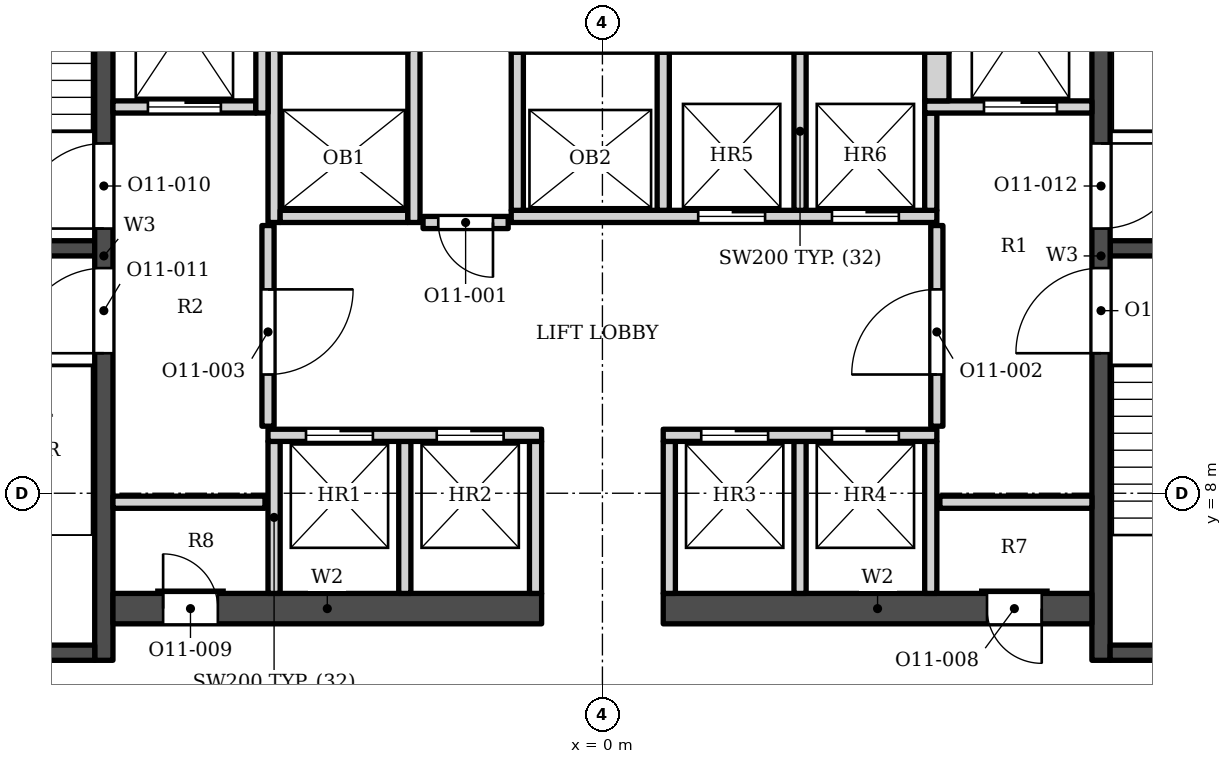
"""IFC4 building model, lengths in metres.
Left out: names, types, materials, properties, quantities, classifications, styles, units other than length and angle.
Written with IfcOpenShell. Run it as: python <this file> out.ifc"""

import sys

from ifc_helpers import new_model, si_unit, direction, frame, frame_2d, origin, place, context, subcontext, project, spatial, rectangle, extrude, element, fill, save


model = new_model("IFC4")
c1 = context("Model", 3, precision=1e-05, world=origin(), true_north=direction((0.0, 1.0)))
c2 = subcontext(c1, "Body", "Model", "MODEL_VIEW")
j1 = project(units=[si_unit("LENGTHUNIT", "METRE"), si_unit("PLANEANGLEUNIT", "RADIAN")], contexts=[c1])
p1 = place(None, origin())
s1 = spatial("IfcSite", under=j1, at=p1, CompositionType="ELEMENT")
p2 = place(p1, origin())
s2 = spatial("IfcBuilding", under=s1, at=p2, CompositionType="ELEMENT")
p3 = place(p2, frame((0.0, 0.0, 271.6)))
s3 = spatial("IfcBuildingStorey", under=s2, at=p3, CompositionType="ELEMENT", Elevation=271.6)
p4 = place(p3, frame((-8.2, 5.253, 0.0), z_axis=(0.0, 0.0, 1.0), x_axis=(0.0, 1.0, 0.0)))
e1 = element("IfcWall", 1, at=p4, inside=s3, PredefinedType="SHEAR", context=c2, shape_type="SweptSolid", body=[
    extrude(rectangle(XDim=13.3, YDim=0.3, at=frame_2d((6.65, 0.0))), origin(), (0.0, 0.0, 1.0), 3.9),
])
p5 = place(p4, frame((7.1, 0.0, 0.0)))
e2 = element("IfcOpeningElement", 2, at=p5, cuts=e1, PredefinedType="OPENING", context=c2, shape_type="SweptSolid", body=[
    extrude(rectangle(XDim=1.4, YDim=2.1, at=frame_2d((0.7, 1.05))), frame((0.0, 0.16, 0.0), z_axis=(0.0, -1.0, 0.0), x_axis=(1.0, 0.0, 0.0)), (0.0, 0.0, 1.0), 0.32),
])
p6 = place(p4, frame((5.05, 0.0, 0.0)))
e3 = element("IfcOpeningElement", 3, at=p6, cuts=e1, PredefinedType="OPENING", context=c2, shape_type="SweptSolid", body=[
    extrude(rectangle(XDim=1.4, YDim=2.1, at=frame_2d((0.7, 1.05))), frame((0.0, 0.16, 0.0), z_axis=(0.0, -1.0, 0.0), x_axis=(1.0, 0.0, 0.0)), (0.0, 0.0, 1.0), 0.32),
])
for number, where, z_axis, x_axis in (
    (4, (-12.1, 12.028, 0.0), (0.0, 0.0, 1.0), (1.0, 0.0, 0.0)),
    (5, (-12.1, 5.378, 0.0), (0.0, 0.0, 1.0), (1.0, 0.0, 0.0)),
):
    element("IfcWall", number, at=place(p3, frame(where, z_axis=z_axis, x_axis=x_axis)), inside=s3, PredefinedType="SHEAR", context=c2, shape_type="SweptSolid", body=[
        extrude(rectangle(XDim=3.75, YDim=0.25, at=frame_2d((1.875, 0.0))), origin(), (0.0, 0.0, 1.0), 3.9),
    ])
p7 = place(p3, frame((8.2, 5.253, 0.0), z_axis=(0.0, 0.0, 1.0), x_axis=(0.0, 1.0, 0.0)))
e6 = element("IfcWall", 6, at=p7, inside=s3, PredefinedType="SHEAR", context=c2, shape_type="SweptSolid", body=[
    extrude(rectangle(XDim=13.3, YDim=0.3, at=frame_2d((6.65, 0.0))), origin(), (0.0, 0.0, 1.0), 3.9),
])
p8 = place(p7, frame((7.1, 0.0, 0.0)))
e7 = element("IfcOpeningElement", 7, at=p8, cuts=e6, PredefinedType="OPENING", context=c2, shape_type="SweptSolid", body=[
    extrude(rectangle(XDim=1.4, YDim=2.1, at=frame_2d((0.7, 1.05))), frame((0.0, 0.16, 0.0), z_axis=(0.0, -1.0, 0.0), x_axis=(1.0, 0.0, 0.0)), (0.0, 0.0, 1.0), 0.32),
])
p9 = place(p7, frame((5.05, 0.0, 0.0)))
e8 = element("IfcOpeningElement", 8, at=p9, cuts=e6, PredefinedType="OPENING", context=c2, shape_type="SweptSolid", body=[
    extrude(rectangle(XDim=1.4, YDim=2.1, at=frame_2d((0.7, 1.05))), frame((0.0, 0.16, 0.0), z_axis=(0.0, -1.0, 0.0), x_axis=(1.0, 0.0, 0.0)), (0.0, 0.0, 1.0), 0.32),
])
for number, where, z_axis, x_axis in (
    (9, (8.35, 12.028, 0.0), (0.0, 0.0, 1.0), (1.0, 0.0, 0.0)),
    (10, (8.35, 5.378, 0.0), (0.0, 0.0, 1.0), (1.0, 0.0, 0.0)),
):
    element("IfcWall", number, at=place(p3, frame(where, z_axis=z_axis, x_axis=x_axis)), inside=s3, PredefinedType="SHEAR", context=c2, shape_type="SweptSolid", body=[
        extrude(rectangle(XDim=3.75, YDim=0.25, at=frame_2d((1.875, 0.0))), origin(), (0.0, 0.0, 1.0), 3.9),
    ])
p10 = place(p3, frame((-8.05, 6.103, 0.0), z_axis=(0.0, 0.0, 1.0), x_axis=(1.0, 0.0, 0.0)))
e11 = element("IfcWall", 11, at=p10, inside=s3, PredefinedType="SHEAR", context=c2, shape_type="SweptSolid", body=[
    extrude(rectangle(XDim=7.05, YDim=0.5, at=frame_2d((3.525, 0.0))), origin(), (0.0, 0.0, 1.0), 3.9),
])
p11 = place(p10, frame((0.825, 0.0, 0.0)))
e12 = element("IfcOpeningElement", 12, at=p11, cuts=e11, PredefinedType="OPENING", context=c2, shape_type="SweptSolid", body=[
    extrude(rectangle(XDim=0.9, YDim=2.1, at=frame_2d((0.45, 1.05))), frame((0.0, 0.26, 0.0), z_axis=(0.0, -1.0, 0.0), x_axis=(1.0, 0.0, 0.0)), (0.0, 0.0, 1.0), 0.52),
])
p12 = place(p3, frame((1.0, 6.103, 0.0), z_axis=(0.0, 0.0, 1.0), x_axis=(1.0, 0.0, 0.0)))
e13 = element("IfcWall", 13, at=p12, inside=s3, PredefinedType="SHEAR", context=c2, shape_type="SweptSolid", body=[
    extrude(rectangle(XDim=7.05, YDim=0.5, at=frame_2d((3.525, 0.0))), origin(), (0.0, 0.0, 1.0), 3.9),
])
p13 = place(p12, frame((5.325, 0.0, 0.0)))
e14 = element("IfcOpeningElement", 14, at=p13, cuts=e13, PredefinedType="OPENING", context=c2, shape_type="SweptSolid", body=[
    extrude(rectangle(XDim=0.9, YDim=2.1, at=frame_2d((0.45, 1.05))), frame((0.0, 0.26, 0.0), z_axis=(0.0, -1.0, 0.0), x_axis=(1.0, 0.0, 0.0)), (0.0, 0.0, 1.0), 0.52),
])
for number, where, z_axis, x_axis in (
    (15, (-5.4, 6.353, 0.0), (0.0, 0.0, 1.0), (0.0, 1.0, 0.0)),
    (16, (-3.25, 6.353, 0.0), (0.0, 0.0, 1.0), (0.0, 1.0, 0.0)),
    (17, (-1.1, 6.353, 0.0), (0.0, 0.0, 1.0), (0.0, 1.0, 0.0)),
    (18, (1.1, 6.353, 0.0), (0.0, 0.0, 1.0), (0.0, 1.0, 0.0)),
    (19, (3.25, 6.353, 0.0), (0.0, 0.0, 1.0), (0.0, 1.0, 0.0)),
    (20, (5.4, 6.353, 0.0), (0.0, 0.0, 1.0), (0.0, 1.0, 0.0)),
    (21, (-8.05, 7.853, 0.0), (0.0, 0.0, 1.0), (1.0, 0.0, 0.0)),
    (22, (5.55, 7.853, 0.0), (0.0, 0.0, 1.0), (1.0, 0.0, 0.0)),
):
    element("IfcWall", number, at=place(p3, frame(where, z_axis=z_axis, x_axis=x_axis)), inside=s3, PredefinedType="SOLIDWALL", context=c2, shape_type="SweptSolid", body=[
        extrude(rectangle(XDim=2.5, YDim=0.2, at=frame_2d((1.25, 0.0))), origin(), (0.0, 0.0, 1.0), 3.73),
    ])
p14 = place(p3, frame((-5.5, 8.953, 0.0), z_axis=(0.0, 0.0, 1.0), x_axis=(1.0, 0.0, 0.0)))
e23 = element("IfcWall", 23, at=p14, inside=s3, PredefinedType="SOLIDWALL", context=c2, shape_type="SweptSolid", body=[
    extrude(rectangle(XDim=4.5, YDim=0.2, at=frame_2d((2.25, 0.0))), origin(), (0.0, 0.0, 1.0), 3.73),
])
p15 = place(p14, frame((0.625, 0.0, 0.0)))
e24 = element("IfcOpeningElement", 24, at=p15, cuts=e23, PredefinedType="OPENING", context=c2, shape_type="SweptSolid", body=[
    extrude(rectangle(XDim=1.1, YDim=2.1, at=frame_2d((0.55, 1.05))), frame((0.0, 0.11, 0.0), z_axis=(0.0, -1.0, 0.0), x_axis=(1.0, 0.0, 0.0)), (0.0, 0.0, 1.0), 0.22),
])
p16 = place(p14, frame((2.775, 0.0, 0.0)))
e25 = element("IfcOpeningElement", 25, at=p16, cuts=e23, PredefinedType="OPENING", context=c2, shape_type="SweptSolid", body=[
    extrude(rectangle(XDim=1.1, YDim=2.1, at=frame_2d((0.55, 1.05))), frame((0.0, 0.11, 0.0), z_axis=(0.0, -1.0, 0.0), x_axis=(1.0, 0.0, 0.0)), (0.0, 0.0, 1.0), 0.22),
])
p17 = place(p3, frame((1.0, 8.953, 0.0), z_axis=(0.0, 0.0, 1.0), x_axis=(1.0, 0.0, 0.0)))
e26 = element("IfcWall", 26, at=p17, inside=s3, PredefinedType="SOLIDWALL", context=c2, shape_type="SweptSolid", body=[
    extrude(rectangle(XDim=4.5, YDim=0.2, at=frame_2d((2.25, 0.0))), origin(), (0.0, 0.0, 1.0), 3.73),
])
p18 = place(p17, frame((0.625, 0.0, 0.0)))
e27 = element("IfcOpeningElement", 27, at=p18, cuts=e26, PredefinedType="OPENING", context=c2, shape_type="SweptSolid", body=[
    extrude(rectangle(XDim=1.1, YDim=2.1, at=frame_2d((0.55, 1.05))), frame((0.0, 0.11, 0.0), z_axis=(0.0, -1.0, 0.0), x_axis=(1.0, 0.0, 0.0)), (0.0, 0.0, 1.0), 0.22),
])
p19 = place(p17, frame((2.775, 0.0, 0.0)))
e28 = element("IfcOpeningElement", 28, at=p19, cuts=e26, PredefinedType="OPENING", context=c2, shape_type="SweptSolid", body=[
    extrude(rectangle(XDim=1.1, YDim=2.1, at=frame_2d((0.55, 1.05))), frame((0.0, 0.11, 0.0), z_axis=(0.0, -1.0, 0.0), x_axis=(1.0, 0.0, 0.0)), (0.0, 0.0, 1.0), 0.22),
])
p20 = place(p3, frame((-5.5, 9.103, 0.0), z_axis=(0.0, 0.0, 1.0), x_axis=(0.0, 1.0, 0.0)))
e29 = element("IfcWall", 29, at=p20, inside=s3, PredefinedType="SOLIDWALL", context=c2, shape_type="SweptSolid", body=[
    extrude(rectangle(XDim=3.3, YDim=0.2, at=frame_2d((1.65, 0.0))), origin(), (0.0, 0.0, 1.0), 3.73),
])
p21 = place(p20, frame((0.85, 0.0, 0.0)))
e30 = element("IfcOpeningElement", 30, at=p21, cuts=e29, PredefinedType="OPENING", context=c2, shape_type="SweptSolid", body=[
    extrude(rectangle(XDim=1.4, YDim=2.1, at=frame_2d((0.7, 1.05))), frame((0.0, 0.11, 0.0), z_axis=(0.0, -1.0, 0.0), x_axis=(1.0, 0.0, 0.0)), (0.0, 0.0, 1.0), 0.22),
])
p22 = place(p3, frame((5.5, 9.103, 0.0), z_axis=(0.0, 0.0, 1.0), x_axis=(0.0, 1.0, 0.0)))
e31 = element("IfcWall", 31, at=p22, inside=s3, PredefinedType="SOLIDWALL", context=c2, shape_type="SweptSolid", body=[
    extrude(rectangle(XDim=3.3, YDim=0.2, at=frame_2d((1.65, 0.0))), origin(), (0.0, 0.0, 1.0), 3.73),
])
p23 = place(p22, frame((0.85, 0.0, 0.0)))
e32 = element("IfcOpeningElement", 32, at=p23, cuts=e31, PredefinedType="OPENING", context=c2, shape_type="SweptSolid", body=[
    extrude(rectangle(XDim=1.4, YDim=2.1, at=frame_2d((0.7, 1.05))), frame((0.0, 0.11, 0.0), z_axis=(0.0, -1.0, 0.0), x_axis=(1.0, 0.0, 0.0)), (0.0, 0.0, 1.0), 0.22),
])
p24 = place(p3, frame((-2.95, 12.453, 0.0), z_axis=(0.0, 0.0, 1.0), x_axis=(1.0, 0.0, 0.0)))
e33 = element("IfcWall", 33, at=p24, inside=s3, PredefinedType="SOLIDWALL", context=c2, shape_type="SweptSolid", body=[
    extrude(rectangle(XDim=1.4, YDim=0.2, at=frame_2d((0.7, 0.0))), origin(), (0.0, 0.0, 1.0), 3.73),
])
p25 = place(p24, frame((0.25, 0.0, 0.0)))
e34 = element("IfcOpeningElement", 34, at=p25, cuts=e33, PredefinedType="OPENING", context=c2, shape_type="SweptSolid", body=[
    extrude(rectangle(XDim=0.9, YDim=2.1, at=frame_2d((0.45, 1.05))), frame((0.0, 0.11, 0.0), z_axis=(0.0, -1.0, 0.0), x_axis=(1.0, 0.0, 0.0)), (0.0, 0.0, 1.0), 0.22),
])
p26 = place(p3, frame((-5.4, 12.453, 0.0), z_axis=(0.0, 0.0, 1.0), x_axis=(0.0, 1.0, 0.0)))
e35 = element("IfcWall", 35, at=p26, inside=s3, PredefinedType="SOLIDWALL", context=c2, shape_type="SweptSolid", body=[
    extrude(rectangle(XDim=3.0, YDim=0.2, at=frame_2d((1.5, 0.0))), origin(), (0.0, 0.0, 1.0), 3.73),
])
p27 = place(p3, frame((-5.3, 12.552, 0.0), z_axis=(0.0, 0.0, 1.0), x_axis=(1.0, 0.0, 0.0)))
e36 = element("IfcWall", 36, at=p27, inside=s3, PredefinedType="SOLIDWALL", context=c2, shape_type="SweptSolid", body=[
    extrude(rectangle(XDim=2.1, YDim=0.2, at=frame_2d((1.05, 0.0))), origin(), (0.0, 0.0, 1.0), 3.73),
])
p28 = place(p3, frame((-3.1, 12.453, 0.0), z_axis=(0.0, 0.0, 1.0), x_axis=(0.0, 1.0, 0.0)))
e37 = element("IfcWall", 37, at=p28, inside=s3, PredefinedType="SOLIDWALL", context=c2, shape_type="SweptSolid", body=[
    extrude(rectangle(XDim=3.0, YDim=0.2, at=frame_2d((1.5, 0.0))), origin(), (0.0, 0.0, 1.0), 3.73),
])
p29 = place(p3, frame((-1.5, 12.552, 0.0), z_axis=(0.0, 0.0, 1.0), x_axis=(1.0, 0.0, 0.0)))
e38 = element("IfcWall", 38, at=p29, inside=s3, PredefinedType="SOLIDWALL", context=c2, shape_type="SweptSolid", body=[
    extrude(rectangle(XDim=7.0, YDim=0.2, at=frame_2d((3.5, 0.0))), origin(), (0.0, 0.0, 1.0), 3.73),
])
p30 = place(p29, frame((3.075, 0.0, 0.0)))
e39 = element("IfcOpeningElement", 39, at=p30, cuts=e38, PredefinedType="OPENING", context=c2, shape_type="SweptSolid", body=[
    extrude(rectangle(XDim=1.1, YDim=2.1, at=frame_2d((0.55, 1.05))), frame((0.0, 0.11, 0.0), z_axis=(0.0, -1.0, 0.0), x_axis=(1.0, 0.0, 0.0)), (0.0, 0.0, 1.0), 0.22),
])
p31 = place(p29, frame((5.275, 0.0, 0.0)))
e40 = element("IfcOpeningElement", 40, at=p31, cuts=e38, PredefinedType="OPENING", context=c2, shape_type="SweptSolid", body=[
    extrude(rectangle(XDim=1.1, YDim=2.1, at=frame_2d((0.55, 1.05))), frame((0.0, 0.11, 0.0), z_axis=(0.0, -1.0, 0.0), x_axis=(1.0, 0.0, 0.0)), (0.0, 0.0, 1.0), 0.22),
])
for number, where, z_axis, x_axis in (
    (41, (-1.4, 12.653, 0.0), (0.0, 0.0, 1.0), (0.0, 1.0, 0.0)),
    (42, (1.0, 12.653, 0.0), (0.0, 0.0, 1.0), (0.0, 1.0, 0.0)),
    (43, (3.25, 12.653, 0.0), (0.0, 0.0, 1.0), (0.0, 1.0, 0.0)),
):
    element("IfcWall", number, at=place(p3, frame(where, z_axis=z_axis, x_axis=x_axis)), inside=s3, PredefinedType="SOLIDWALL", context=c2, shape_type="SweptSolid", body=[
        extrude(rectangle(XDim=2.6, YDim=0.2, at=frame_2d((1.3, 0.0))), origin(), (0.0, 0.0, 1.0), 3.73),
    ])
p32 = place(p3, frame((5.4, 12.653, 0.0), z_axis=(0.0, 0.0, 1.0), x_axis=(0.0, 1.0, 0.0)))
e44 = element("IfcWall", 44, at=p32, inside=s3, PredefinedType="SOLIDWALL", context=c2, shape_type="SweptSolid", body=[
    extrude(rectangle(XDim=1.6, YDim=0.2, at=frame_2d((0.8, 0.0))), origin(), (0.0, 0.0, 1.0), 3.73),
])
p33 = place(p3, frame((-8.05, 14.353, 0.0), z_axis=(0.0, 0.0, 1.0), x_axis=(1.0, 0.0, 0.0)))
e45 = element("IfcWall", 45, at=p33, inside=s3, PredefinedType="SOLIDWALL", context=c2, shape_type="SweptSolid", body=[
    extrude(rectangle(XDim=2.35, YDim=0.2, at=frame_2d((1.175, 0.0))), origin(), (0.0, 0.0, 1.0), 3.73),
])
p34 = place(p33, frame((0.575, 0.0, 0.0)))
e46 = element("IfcOpeningElement", 46, at=p34, cuts=e45, PredefinedType="OPENING", context=c2, shape_type="SweptSolid", body=[
    extrude(rectangle(XDim=1.2, YDim=2.1, at=frame_2d((0.6, 1.05))), frame((0.0, 0.11, 0.0), z_axis=(0.0, -1.0, 0.0), x_axis=(1.0, 0.0, 0.0)), (0.0, 0.0, 1.0), 0.22),
])
p35 = place(p3, frame((-5.6, 14.253, 0.0), z_axis=(0.0, 0.0, 1.0), x_axis=(0.0, 1.0, 0.0)))
e47 = element("IfcWall", 47, at=p35, inside=s3, PredefinedType="SOLIDWALL", context=c2, shape_type="SweptSolid", body=[
    extrude(rectangle(XDim=4.3, YDim=0.2, at=frame_2d((2.15, 0.0))), origin(), (0.0, 0.0, 1.0), 3.73),
])
p36 = place(p3, frame((5.3, 14.353, 0.0), z_axis=(0.0, 0.0, 1.0), x_axis=(1.0, 0.0, 0.0)))
e48 = element("IfcWall", 48, at=p36, inside=s3, PredefinedType="SOLIDWALL", context=c2, shape_type="SweptSolid", body=[
    extrude(rectangle(XDim=2.75, YDim=0.2, at=frame_2d((1.375, 0.0))), origin(), (0.0, 0.0, 1.0), 3.73),
])
p37 = place(p36, frame((0.975, 0.0, 0.0)))
e49 = element("IfcOpeningElement", 49, at=p37, cuts=e48, PredefinedType="OPENING", context=c2, shape_type="SweptSolid", body=[
    extrude(rectangle(XDim=1.2, YDim=2.1, at=frame_2d((0.6, 1.05))), frame((0.0, 0.11, 0.0), z_axis=(0.0, -1.0, 0.0), x_axis=(1.0, 0.0, 0.0)), (0.0, 0.0, 1.0), 0.22),
])
p38 = place(p3, frame((5.5, 14.453, 0.0), z_axis=(0.0, 0.0, 1.0), x_axis=(0.0, 1.0, 0.0)))
e50 = element("IfcWall", 50, at=p38, inside=s3, PredefinedType="SOLIDWALL", context=c2, shape_type="SweptSolid", body=[
    extrude(rectangle(XDim=0.8, YDim=0.4, at=frame_2d((0.4, 0.0))), origin(), (0.0, 0.0, 1.0), 3.73),
])
p39 = place(p3, frame((-5.3, 15.353, 0.0), z_axis=(0.0, 0.0, 1.0), x_axis=(1.0, 0.0, 0.0)))
e51 = element("IfcWall", 51, at=p39, inside=s3, PredefinedType="SOLIDWALL", context=c2, shape_type="SweptSolid", body=[
    extrude(rectangle(XDim=2.1, YDim=0.2, at=frame_2d((1.05, 0.0))), origin(), (0.0, 0.0, 1.0), 3.73),
])
p40 = place(p3, frame((-1.5, 15.353, 0.0), z_axis=(0.0, 0.0, 1.0), x_axis=(1.0, 0.0, 0.0)))
e52 = element("IfcWall", 52, at=p40, inside=s3, PredefinedType="SOLIDWALL", context=c2, shape_type="SweptSolid", body=[
    extrude(rectangle(XDim=7.2, YDim=0.2, at=frame_2d((3.6, 0.0))), origin(), (0.0, 0.0, 1.0), 3.73),
])
p41 = place(p15, origin())
e53 = element("IfcDoor", 53, at=p41, inside=s3, OperationType="DOUBLE_DOOR_SLIDING", PredefinedType="DOOR", context=c2, shape_type="SweptSolid", body=[
    extrude(rectangle(XDim=1.1, YDim=2.1, at=frame_2d((0.55, 1.05))), frame((0.0, 0.025, 0.0), z_axis=(0.0, -1.0, 0.0), x_axis=(1.0, 0.0, 0.0)), (0.0, 0.0, 1.0), 0.05),
])
fill(e24, e53)
p42 = place(p16, origin())
e54 = element("IfcDoor", 54, at=p42, inside=s3, OperationType="DOUBLE_DOOR_SLIDING", PredefinedType="DOOR", context=c2, shape_type="SweptSolid", body=[
    extrude(rectangle(XDim=1.1, YDim=2.1, at=frame_2d((0.55, 1.05))), frame((0.0, 0.025, 0.0), z_axis=(0.0, -1.0, 0.0), x_axis=(1.0, 0.0, 0.0)), (0.0, 0.0, 1.0), 0.05),
])
fill(e25, e54)
p43 = place(p18, origin())
e55 = element("IfcDoor", 55, at=p43, inside=s3, OperationType="DOUBLE_DOOR_SLIDING", PredefinedType="DOOR", context=c2, shape_type="SweptSolid", body=[
    extrude(rectangle(XDim=1.1, YDim=2.1, at=frame_2d((0.55, 1.05))), frame((0.0, 0.025, 0.0), z_axis=(0.0, -1.0, 0.0), x_axis=(1.0, 0.0, 0.0)), (0.0, 0.0, 1.0), 0.05),
])
fill(e27, e55)
p44 = place(p19, origin())
e56 = element("IfcDoor", 56, at=p44, inside=s3, OperationType="DOUBLE_DOOR_SLIDING", PredefinedType="DOOR", context=c2, shape_type="SweptSolid", body=[
    extrude(rectangle(XDim=1.1, YDim=2.1, at=frame_2d((0.55, 1.05))), frame((0.0, 0.025, 0.0), z_axis=(0.0, -1.0, 0.0), x_axis=(1.0, 0.0, 0.0)), (0.0, 0.0, 1.0), 0.05),
])
fill(e28, e56)
p45 = place(p30, origin())
e57 = element("IfcDoor", 57, at=p45, inside=s3, OperationType="DOUBLE_DOOR_SLIDING", PredefinedType="DOOR", context=c2, shape_type="SweptSolid", body=[
    extrude(rectangle(XDim=1.1, YDim=2.1, at=frame_2d((0.55, 1.05))), frame((0.0, 0.025, 0.0), z_axis=(0.0, -1.0, 0.0), x_axis=(1.0, 0.0, 0.0)), (0.0, 0.0, 1.0), 0.05),
])
fill(e39, e57)
p46 = place(p31, origin())
e58 = element("IfcDoor", 58, at=p46, inside=s3, OperationType="DOUBLE_DOOR_SLIDING", PredefinedType="DOOR", context=c2, shape_type="SweptSolid", body=[
    extrude(rectangle(XDim=1.1, YDim=2.1, at=frame_2d((0.55, 1.05))), frame((0.0, 0.025, 0.0), z_axis=(0.0, -1.0, 0.0), x_axis=(1.0, 0.0, 0.0)), (0.0, 0.0, 1.0), 0.05),
])
fill(e40, e58)
p47 = place(p34, origin())
e59 = element("IfcDoor", 59, at=p47, inside=s3, OperationType="DOUBLE_DOOR_SLIDING", PredefinedType="DOOR", context=c2, shape_type="SweptSolid", body=[
    extrude(rectangle(XDim=1.2, YDim=2.1, at=frame_2d((0.6, 1.05))), frame((0.0, 0.025, 0.0), z_axis=(0.0, -1.0, 0.0), x_axis=(1.0, 0.0, 0.0)), (0.0, 0.0, 1.0), 0.05),
])
fill(e46, e59)
p48 = place(p37, origin())
e60 = element("IfcDoor", 60, at=p48, inside=s3, OperationType="DOUBLE_DOOR_SLIDING", PredefinedType="DOOR", context=c2, shape_type="SweptSolid", body=[
    extrude(rectangle(XDim=1.2, YDim=2.1, at=frame_2d((0.6, 1.05))), frame((0.0, 0.025, 0.0), z_axis=(0.0, -1.0, 0.0), x_axis=(1.0, 0.0, 0.0)), (0.0, 0.0, 1.0), 0.05),
])
fill(e49, e60)
p49 = place(p5, origin())
e61 = element("IfcDoor", 61, at=p49, inside=s3, OperationType="SINGLE_SWING_LEFT", PredefinedType="DOOR", context=c2, shape_type="SweptSolid", body=[
    extrude(rectangle(XDim=1.4, YDim=2.1, at=frame_2d((0.7, 1.05))), frame((0.0, 0.025, 0.0), z_axis=(0.0, -1.0, 0.0), x_axis=(1.0, 0.0, 0.0)), (0.0, 0.0, 1.0), 0.05),
])
fill(e2, e61)
p50 = place(p6, origin())
e62 = element("IfcDoor", 62, at=p50, inside=s3, OperationType="SINGLE_SWING_LEFT", PredefinedType="DOOR", context=c2, shape_type="SweptSolid", body=[
    extrude(rectangle(XDim=1.4, YDim=2.1, at=frame_2d((0.7, 1.05))), frame((0.0, 0.025, 0.0), z_axis=(0.0, -1.0, 0.0), x_axis=(1.0, 0.0, 0.0)), (0.0, 0.0, 1.0), 0.05),
])
fill(e3, e62)
p51 = place(p8, origin())
e63 = element("IfcDoor", 63, at=p51, inside=s3, OperationType="SINGLE_SWING_RIGHT", PredefinedType="DOOR", context=c2, shape_type="SweptSolid", body=[
    extrude(rectangle(XDim=1.4, YDim=2.1, at=frame_2d((0.7, 1.05))), frame((0.0, 0.025, 0.0), z_axis=(0.0, -1.0, 0.0), x_axis=(1.0, 0.0, 0.0)), (0.0, 0.0, 1.0), 0.05),
])
fill(e7, e63)
p52 = place(p9, origin())
e64 = element("IfcDoor", 64, at=p52, inside=s3, OperationType="SINGLE_SWING_LEFT", PredefinedType="DOOR", context=c2, shape_type="SweptSolid", body=[
    extrude(rectangle(XDim=1.4, YDim=2.1, at=frame_2d((0.7, 1.05))), frame((0.0, 0.025, 0.0), z_axis=(0.0, -1.0, 0.0), x_axis=(1.0, 0.0, 0.0)), (0.0, 0.0, 1.0), 0.05),
])
fill(e8, e64)
p53 = place(p25, origin())
e65 = element("IfcDoor", 65, at=p53, inside=s3, OperationType="SINGLE_SWING_RIGHT", PredefinedType="DOOR", context=c2, shape_type="SweptSolid", body=[
    extrude(rectangle(XDim=0.9, YDim=2.1, at=frame_2d((0.45, 1.05))), frame((0.0, 0.025, 0.0), z_axis=(0.0, -1.0, 0.0), x_axis=(1.0, 0.0, 0.0)), (0.0, 0.0, 1.0), 0.05),
])
fill(e34, e65)
p54 = place(p21, origin())
e66 = element("IfcDoor", 66, at=p54, inside=s3, OperationType="SINGLE_SWING_RIGHT", PredefinedType="DOOR", context=c2, shape_type="SweptSolid", body=[
    extrude(rectangle(XDim=1.4, YDim=2.1, at=frame_2d((0.7, 1.05))), frame((0.0, 0.025, 0.0), z_axis=(0.0, -1.0, 0.0), x_axis=(1.0, 0.0, 0.0)), (0.0, 0.0, 1.0), 0.05),
])
fill(e30, e66)
p55 = place(p23, origin())
e67 = element("IfcDoor", 67, at=p55, inside=s3, OperationType="SINGLE_SWING_LEFT", PredefinedType="DOOR", context=c2, shape_type="SweptSolid", body=[
    extrude(rectangle(XDim=1.4, YDim=2.1, at=frame_2d((0.7, 1.05))), frame((0.0, 0.025, 0.0), z_axis=(0.0, -1.0, 0.0), x_axis=(1.0, 0.0, 0.0)), (0.0, 0.0, 1.0), 0.05),
])
fill(e32, e67)
p56 = place(p11, origin())
e68 = element("IfcDoor", 68, at=p56, inside=s3, OperationType="SINGLE_SWING_LEFT", PredefinedType="DOOR", context=c2, shape_type="SweptSolid", body=[
    extrude(rectangle(XDim=0.9, YDim=2.1, at=frame_2d((0.45, 1.05))), frame((0.0, 0.025, 0.0), z_axis=(0.0, -1.0, 0.0), x_axis=(1.0, 0.0, 0.0)), (0.0, 0.0, 1.0), 0.05),
])
fill(e12, e68)
p57 = place(p13, origin())
e69 = element("IfcDoor", 69, at=p57, inside=s3, OperationType="SINGLE_SWING_RIGHT", PredefinedType="DOOR", context=c2, shape_type="SweptSolid", body=[
    extrude(rectangle(XDim=0.9, YDim=2.1, at=frame_2d((0.45, 1.05))), frame((0.0, 0.025, 0.0), z_axis=(0.0, -1.0, 0.0), x_axis=(1.0, 0.0, 0.0)), (0.0, 0.0, 1.0), 0.05),
])
fill(e14, e69)
save(model, sys.argv[1])
